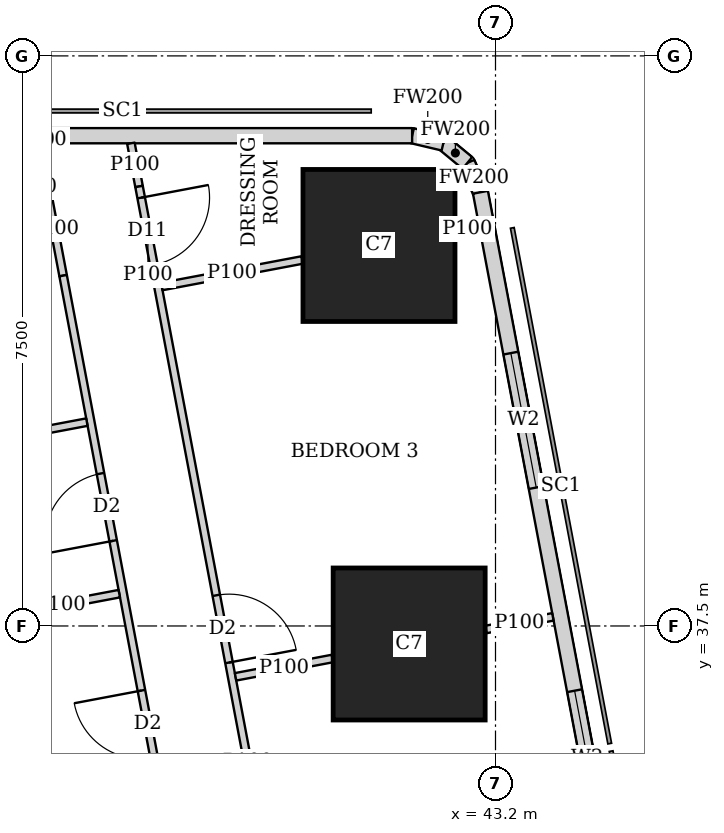
"""IFC4 building model, lengths in metres.
Left out: names, types, materials, properties, quantities, classifications, styles, units other than length and angle.
Written with IfcOpenShell. Run it as: python <this file> out.ifc"""

import sys

from ifc_helpers import new_model, si_unit, direction, frame, frame_2d, origin, origin_2d, place, context, subcontext, project, spatial, rectangle, extrude, element, fill, save


model = new_model("IFC4")
c1 = context("Model", 3, precision=1e-05, world=origin(), true_north=direction((0.0, 1.0)))
c2 = subcontext(c1, "Body", "Model", "MODEL_VIEW")
j1 = project(units=[si_unit("LENGTHUNIT", "METRE"), si_unit("PLANEANGLEUNIT", "RADIAN")], contexts=[c1])
p1 = place(None, origin())
s1 = spatial("IfcSite", under=j1, at=p1, CompositionType="ELEMENT")
p2 = place(p1, origin())
s2 = spatial("IfcBuilding", under=s1, at=p2, CompositionType="ELEMENT")
p3 = place(p2, frame((0.0, 0.0, 270.35)))
s3 = spatial("IfcBuildingStorey", under=s2, at=p3, CompositionType="ELEMENT", Elevation=270.35)
for number, where, z_axis, x_axis in (
    (1, (42.064, 37.263, 0.0), (0.0, 0.0, 1.0), (1.0, 0.0, 0.0)),
    (2, (41.667, 42.506, 0.0), (0.0, 0.0, 1.0), (1.0, 0.0, 0.0)),
):
    element("IfcColumn", number, at=place(p3, frame(where, z_axis=z_axis, x_axis=x_axis)), inside=s3, PredefinedType="COLUMN", context=c2, shape_type="SweptSolid", body=[
        extrude(rectangle(XDim=2.0, YDim=2.0, at=origin_2d()), origin(), (0.0, 0.0, 1.0), 3.75),
    ])
p4 = place(p3, frame((49.684, 7.832, 0.0), z_axis=(0.0, 0.0, 1.0), x_axis=(-0.185616669694, 0.982622232565, 0.0)))
e3 = element("IfcWall", 3, at=p4, inside=s3, PredefinedType="SOLIDWALL", context=c2, shape_type="SweptSolid", body=[
    extrude(rectangle(XDim=36.0, YDim=0.2, at=frame_2d((18.0, 0.0))), origin(), (0.0, 0.0, 1.0), 3.5),
])
p5 = place(p4, frame((2.518, 0.0, 0.9)))
e4 = element("IfcOpeningElement", 4, at=p5, cuts=e3, PredefinedType="OPENING", context=c2, shape_type="SweptSolid", body=[
    extrude(rectangle(XDim=2.4, YDim=1.5, at=frame_2d((1.2, 0.75))), frame((0.0, 0.11, 0.0), z_axis=(0.0, -1.0, 0.0), x_axis=(1.0, 0.0, 0.0)), (0.0, 0.0, 1.0), 0.22),
])
p6 = place(p4, frame((8.444, 0.0, 0.9)))
e5 = element("IfcOpeningElement", 5, at=p6, cuts=e3, PredefinedType="OPENING", context=c2, shape_type="SweptSolid", body=[
    extrude(rectangle(XDim=1.8, YDim=1.5, at=frame_2d((0.9, 0.75))), frame((0.0, 0.11, 0.0), z_axis=(0.0, -1.0, 0.0), x_axis=(1.0, 0.0, 0.0)), (0.0, 0.0, 1.0), 0.22),
])
p7 = place(p4, frame((12.261, 0.0, 0.9)))
e6 = element("IfcOpeningElement", 6, at=p7, cuts=e3, PredefinedType="OPENING", context=c2, shape_type="SweptSolid", body=[
    extrude(rectangle(XDim=1.8, YDim=1.5, at=frame_2d((0.9, 0.75))), frame((0.0, 0.11, 0.0), z_axis=(0.0, -1.0, 0.0), x_axis=(1.0, 0.0, 0.0)), (0.0, 0.0, 1.0), 0.22),
])
p8 = place(p4, frame((16.078, 0.0, 0.9)))
e7 = element("IfcOpeningElement", 7, at=p8, cuts=e3, PredefinedType="OPENING", context=c2, shape_type="SweptSolid", body=[
    extrude(rectangle(XDim=1.8, YDim=1.5, at=frame_2d((0.9, 0.75))), frame((0.0, 0.11, 0.0), z_axis=(0.0, -1.0, 0.0), x_axis=(1.0, 0.0, 0.0)), (0.0, 0.0, 1.0), 0.22),
])
p9 = place(p4, frame((19.894, 0.0, 0.9)))
e8 = element("IfcOpeningElement", 8, at=p9, cuts=e3, PredefinedType="OPENING", context=c2, shape_type="SweptSolid", body=[
    extrude(rectangle(XDim=1.8, YDim=1.5, at=frame_2d((0.9, 0.75))), frame((0.0, 0.11, 0.0), z_axis=(0.0, -1.0, 0.0), x_axis=(1.0, 0.0, 0.0)), (0.0, 0.0, 1.0), 0.22),
])
p10 = place(p4, frame((23.71, 0.0, 0.9)))
e9 = element("IfcOpeningElement", 9, at=p10, cuts=e3, PredefinedType="OPENING", context=c2, shape_type="SweptSolid", body=[
    extrude(rectangle(XDim=1.8, YDim=1.5, at=frame_2d((0.9, 0.75))), frame((0.0, 0.11, 0.0), z_axis=(0.0, -1.0, 0.0), x_axis=(1.0, 0.0, 0.0)), (0.0, 0.0, 1.0), 0.22),
])
p11 = place(p4, frame((27.526, 0.0, 0.9)))
e10 = element("IfcOpeningElement", 10, at=p11, cuts=e3, PredefinedType="OPENING", context=c2, shape_type="SweptSolid", body=[
    extrude(rectangle(XDim=1.8, YDim=1.5, at=frame_2d((0.9, 0.75))), frame((0.0, 0.11, 0.0), z_axis=(0.0, -1.0, 0.0), x_axis=(1.0, 0.0, 0.0)), (0.0, 0.0, 1.0), 0.22),
])
p12 = place(p4, frame((32.046, 0.0, 0.9)))
e11 = element("IfcOpeningElement", 11, at=p12, cuts=e3, PredefinedType="OPENING", context=c2, shape_type="SweptSolid", body=[
    extrude(rectangle(XDim=1.8, YDim=1.5, at=frame_2d((0.9, 0.75))), frame((0.0, 0.11, 0.0), z_axis=(0.0, -1.0, 0.0), x_axis=(1.0, 0.0, 0.0)), (0.0, 0.0, 1.0), 0.22),
])
p13 = place(p3, frame((43.002, 43.206, 0.0), z_axis=(0.0, 0.0, 1.0), x_axis=(-0.40678170573, 0.913525393124, 0.0)))
e12 = element("IfcWall", 12, at=p13, inside=s3, PredefinedType="SOLIDWALL", context=c2, shape_type="SweptSolid", body=[
    extrude(rectangle(XDim=0.423, YDim=0.2, at=frame_2d((0.211, 0.0))), origin(), (0.0, 0.0, 1.0), 3.5),
])
p14 = place(p3, frame((42.83, 43.592, 0.0), z_axis=(0.0, 0.0, 1.0), x_axis=(-0.771190539797, 0.636604391539, 0.0)))
e13 = element("IfcWall", 13, at=p14, inside=s3, PredefinedType="SOLIDWALL", context=c2, shape_type="SweptSolid", body=[
    extrude(rectangle(XDim=0.41, YDim=0.2, at=frame_2d((0.205, 0.0))), origin(), (0.0, 0.0, 1.0), 3.5),
])
p15 = place(p3, frame((42.514, 43.853, 0.0), z_axis=(0.0, 0.0, 1.0), x_axis=(-0.973288080424, 0.229587265555, 0.0)))
e14 = element("IfcWall", 14, at=p15, inside=s3, PredefinedType="SOLIDWALL", context=c2, shape_type="SweptSolid", body=[
    extrude(rectangle(XDim=0.422, YDim=0.2, at=frame_2d((0.211, 0.0))), origin(), (0.0, 0.0, 1.0), 3.5),
])
p16 = place(p3, frame((42.103, 43.95, 0.0), z_axis=(0.0, 0.0, 1.0), x_axis=(-1.0, 0.0, 0.0)))
e15 = element("IfcWall", 15, at=p16, inside=s3, PredefinedType="SOLIDWALL", context=c2, shape_type="SweptSolid", body=[
    extrude(rectangle(XDim=27.54, YDim=0.2, at=frame_2d((13.77, 0.0))), origin(), (0.0, 0.0, 1.0), 3.5),
])
p17 = place(p16, frame((10.603, 0.0, 0.9)))
e16 = element("IfcOpeningElement", 16, at=p17, cuts=e15, PredefinedType="OPENING", context=c2, shape_type="SweptSolid", body=[
    extrude(rectangle(XDim=1.8, YDim=1.5, at=frame_2d((0.9, 0.75))), frame((0.0, 0.11, 0.0), z_axis=(0.0, -1.0, 0.0), x_axis=(1.0, 0.0, 0.0)), (0.0, 0.0, 1.0), 0.22),
])
p18 = place(p16, frame((14.203, 0.0, 0.9)))
e17 = element("IfcOpeningElement", 17, at=p18, cuts=e15, PredefinedType="OPENING", context=c2, shape_type="SweptSolid", body=[
    extrude(rectangle(XDim=1.8, YDim=1.5, at=frame_2d((0.9, 0.75))), frame((0.0, 0.11, 0.0), z_axis=(0.0, -1.0, 0.0), x_axis=(1.0, 0.0, 0.0)), (0.0, 0.0, 1.0), 0.22),
])
p19 = place(p16, frame((17.803, 0.0, 0.9)))
e18 = element("IfcOpeningElement", 18, at=p19, cuts=e15, PredefinedType="OPENING", context=c2, shape_type="SweptSolid", body=[
    extrude(rectangle(XDim=1.8, YDim=1.5, at=frame_2d((0.9, 0.75))), frame((0.0, 0.11, 0.0), z_axis=(0.0, -1.0, 0.0), x_axis=(1.0, 0.0, 0.0)), (0.0, 0.0, 1.0), 0.22),
])
p20 = place(p16, frame((22.822, 0.0, 0.9)))
e19 = element("IfcOpeningElement", 19, at=p20, cuts=e15, PredefinedType="OPENING", context=c2, shape_type="SweptSolid", body=[
    extrude(rectangle(XDim=2.4, YDim=1.5, at=frame_2d((1.2, 0.75))), frame((0.0, 0.11, 0.0), z_axis=(0.0, -1.0, 0.0), x_axis=(1.0, 0.0, 0.0)), (0.0, 0.0, 1.0), 0.22),
])
p21 = place(p3, frame((34.036, 42.186, 0.0), z_axis=(0.0, 0.0, 1.0), x_axis=(0.185593518645, -0.9826266055, 0.0)))
e20 = element("IfcWall", 20, at=p21, inside=s3, PredefinedType="SOLIDWALL", context=c2, shape_type="SweptSolid", body=[
    extrude(rectangle(XDim=35.961, YDim=0.15, at=frame_2d((17.98, 0.0))), origin(), (0.0, 0.0, 1.0), 2.5),
])
p22 = place(p21, frame((15.529, 0.0, 0.0)))
e21 = element("IfcOpeningElement", 21, at=p22, cuts=e20, PredefinedType="OPENING", context=c2, shape_type="SweptSolid", body=[
    extrude(rectangle(XDim=1.0, YDim=2.1, at=frame_2d((0.5, 1.05))), frame((0.0, 0.085, 0.0), z_axis=(0.0, -1.0, 0.0), x_axis=(1.0, 0.0, 0.0)), (0.0, 0.0, 1.0), 0.17),
])
p23 = place(p21, frame((19.345, 0.0, 0.0)))
e22 = element("IfcOpeningElement", 22, at=p23, cuts=e20, PredefinedType="OPENING", context=c2, shape_type="SweptSolid", body=[
    extrude(rectangle(XDim=1.0, YDim=2.1, at=frame_2d((0.5, 1.05))), frame((0.0, 0.085, 0.0), z_axis=(0.0, -1.0, 0.0), x_axis=(1.0, 0.0, 0.0)), (0.0, 0.0, 1.0), 0.17),
])
p24 = place(p21, frame((30.594, 0.0, 0.0)))
e23 = element("IfcOpeningElement", 23, at=p24, cuts=e20, PredefinedType="OPENING", context=c2, shape_type="SweptSolid", body=[
    extrude(rectangle(XDim=1.0, YDim=2.1, at=frame_2d((0.5, 1.05))), frame((0.0, 0.085, 0.0), z_axis=(0.0, -1.0, 0.0), x_axis=(1.0, 0.0, 0.0)), (0.0, 0.0, 1.0), 0.17),
])
p25 = place(p3, frame((38.403, 43.85, 0.0), z_axis=(0.0, 0.0, 1.0), x_axis=(0.184976954078, -0.982742858768, 0.0)))
e24 = element("IfcWall", 24, at=p25, inside=s3, PredefinedType="PARTITIONING", context=c2, shape_type="SweptSolid", body=[
    extrude(rectangle(XDim=0.578, YDim=0.1, at=frame_2d((0.289, 0.0))), origin(), (0.0, 0.0, 1.0), 3.5),
])
p26 = place(p3, frame((38.51, 43.282, 0.0), z_axis=(0.0, 0.0, 1.0), x_axis=(0.185775287495, -0.982592256511, 0.0)))
e25 = element("IfcWall", 25, at=p26, inside=s3, PredefinedType="PARTITIONING", context=c2, shape_type="SweptSolid", body=[
    extrude(rectangle(XDim=1.259, YDim=0.1, at=frame_2d((0.629, 0.0))), origin(), (0.0, 0.0, 1.0), 2.05),
])
p27 = place(p26, frame((0.15, 0.0, 0.0)))
e26 = element("IfcOpeningElement", 26, at=p27, cuts=e25, PredefinedType="OPENING", context=c2, shape_type="SweptSolid", body=[
    extrude(rectangle(XDim=0.9, YDim=2.0, at=frame_2d((0.45, 1.0))), frame((0.0, 0.06, 0.0), z_axis=(0.0, -1.0, 0.0), x_axis=(1.0, 0.0, 0.0)), (0.0, 0.0, 1.0), 0.12),
])
p28 = place(p3, frame((38.744, 42.045, 0.0), z_axis=(0.0, 0.0, 1.0), x_axis=(0.185614085367, -0.982622720739, 0.0)))
e27 = element("IfcWall", 27, at=p28, inside=s3, PredefinedType="PARTITIONING", context=c2, shape_type="SweptSolid", body=[
    extrude(rectangle(XDim=12.898, YDim=0.1, at=frame_2d((6.449, 0.0))), origin(), (0.0, 0.0, 1.0), 2.5),
])
p29 = place(p28, frame((11.848, 0.0, 0.0)))
e28 = element("IfcOpeningElement", 28, at=p29, cuts=e27, PredefinedType="OPENING", context=c2, shape_type="SweptSolid", body=[
    extrude(rectangle(XDim=0.9, YDim=2.1, at=frame_2d((0.45, 1.05))), frame((0.0, 0.06, 0.0), z_axis=(0.0, -1.0, 0.0), x_axis=(1.0, 0.0, 0.0)), (0.0, 0.0, 1.0), 0.12),
])
p30 = place(p28, frame((8.191, 0.0, 0.0)))
e29 = element("IfcOpeningElement", 29, at=p30, cuts=e27, PredefinedType="OPENING", context=c2, shape_type="SweptSolid", body=[
    extrude(rectangle(XDim=0.9, YDim=2.1, at=frame_2d((0.45, 1.05))), frame((0.0, 0.06, 0.0), z_axis=(0.0, -1.0, 0.0), x_axis=(1.0, 0.0, 0.0)), (0.0, 0.0, 1.0), 0.12),
])
p31 = place(p28, frame((4.215, 0.0, 0.0)))
e30 = element("IfcOpeningElement", 30, at=p31, cuts=e27, PredefinedType="OPENING", context=c2, shape_type="SweptSolid", body=[
    extrude(rectangle(XDim=0.9, YDim=2.1, at=frame_2d((0.45, 1.05))), frame((0.0, 0.06, 0.0), z_axis=(0.0, -1.0, 0.0), x_axis=(1.0, 0.0, 0.0)), (0.0, 0.0, 1.0), 0.12),
])
p32 = place(p3, frame((37.277, 43.346, 0.0), z_axis=(0.0, 0.0, 1.0), x_axis=(0.185775287495, -0.982592256511, 0.0)))
e31 = element("IfcWall", 31, at=p32, inside=s3, PredefinedType="PARTITIONING", context=c2, shape_type="SweptSolid", body=[
    extrude(rectangle(XDim=1.259, YDim=0.1, at=frame_2d((0.629, 0.0))), origin(), (0.0, 0.0, 1.0), 2.05),
])
p33 = place(p3, frame((37.511, 42.109, 0.0), z_axis=(0.0, 0.0, 1.0), x_axis=(0.185550464988, -0.982634736279, 0.0)))
e32 = element("IfcWall", 32, at=p33, inside=s3, PredefinedType="PARTITIONING", context=c2, shape_type="SweptSolid", body=[
    extrude(rectangle(XDim=13.35, YDim=0.1, at=frame_2d((6.675, 0.0))), origin(), (0.0, 0.0, 1.0), 2.5),
])
p34 = place(p33, frame((11.845, 0.0, 0.0)))
e33 = element("IfcOpeningElement", 33, at=p34, cuts=e32, PredefinedType="OPENING", context=c2, shape_type="SweptSolid", body=[
    extrude(rectangle(XDim=0.9, YDim=2.1, at=frame_2d((0.45, 1.05))), frame((0.0, 0.06, 0.0), z_axis=(0.0, -1.0, 0.0), x_axis=(1.0, 0.0, 0.0)), (0.0, 0.0, 1.0), 0.12),
])
p35 = place(p33, frame((8.224, 0.0, 0.0)))
e34 = element("IfcOpeningElement", 34, at=p35, cuts=e32, PredefinedType="OPENING", context=c2, shape_type="SweptSolid", body=[
    extrude(rectangle(XDim=0.9, YDim=2.1, at=frame_2d((0.45, 1.05))), frame((0.0, 0.06, 0.0), z_axis=(0.0, -1.0, 0.0), x_axis=(1.0, 0.0, 0.0)), (0.0, 0.0, 1.0), 0.12),
])
p36 = place(p33, frame((2.65, 0.0, 0.0)))
e35 = element("IfcOpeningElement", 35, at=p36, cuts=e32, PredefinedType="OPENING", context=c2, shape_type="SweptSolid", body=[
    extrude(rectangle(XDim=0.9, YDim=2.1, at=frame_2d((0.45, 1.05))), frame((0.0, 0.06, 0.0), z_axis=(0.0, -1.0, 0.0), x_axis=(1.0, 0.0, 0.0)), (0.0, 0.0, 1.0), 0.12),
])
p37 = place(p33, frame((9.936, 0.0, 0.0)))
e36 = element("IfcOpeningElement", 36, at=p37, cuts=e32, PredefinedType="OPENING", context=c2, shape_type="SweptSolid", body=[
    extrude(rectangle(XDim=0.9, YDim=2.1, at=frame_2d((0.45, 1.05))), frame((0.0, 0.06, 0.0), z_axis=(0.0, -1.0, 0.0), x_axis=(1.0, 0.0, 0.0)), (0.0, 0.0, 1.0), 0.12),
])
p38 = place(p33, frame((5.555, 0.0, 0.0)))
e37 = element("IfcOpeningElement", 37, at=p38, cuts=e32, PredefinedType="OPENING", context=c2, shape_type="SweptSolid", body=[
    extrude(rectangle(XDim=0.9, YDim=2.1, at=frame_2d((0.45, 1.05))), frame((0.0, 0.06, 0.0), z_axis=(0.0, -1.0, 0.0), x_axis=(1.0, 0.0, 0.0)), (0.0, 0.0, 1.0), 0.12),
])
p39 = place(p3, frame((42.985, 42.755, 0.0), z_axis=(0.0, 0.0, 1.0), x_axis=(-0.98281924824, -0.184570651215, 0.0)))
e38 = element("IfcWall", 38, at=p39, inside=s3, PredefinedType="PARTITIONING", context=c2, shape_type="SweptSolid", body=[
    extrude(rectangle(XDim=0.313, YDim=0.1, at=frame_2d((0.157, 0.0))), origin(), (0.0, 0.0, 1.0), 3.5),
])
p40 = place(p3, frame((40.657, 42.315, 0.0), z_axis=(0.0, 0.0, 1.0), x_axis=(-0.982622785543, -0.185613742305, 0.0)))
e39 = element("IfcWall", 39, at=p40, inside=s3, PredefinedType="PARTITIONING", context=c2, shape_type="SweptSolid", body=[
    extrude(rectangle(XDim=1.88, YDim=0.1, at=frame_2d((0.94, 0.0))), origin(), (0.0, 0.0, 1.0), 2.05),
])
p41 = place(p3, frame((43.955, 37.62, 0.0), z_axis=(0.0, 0.0, 1.0), x_axis=(-0.982708424405, -0.18515980288, 0.0)))
e40 = element("IfcWall", 40, at=p41, inside=s3, PredefinedType="PARTITIONING", context=c2, shape_type="SweptSolid", body=[
    extrude(rectangle(XDim=0.897, YDim=0.1, at=frame_2d((0.448, 0.0))), origin(), (0.0, 0.0, 1.0), 3.5),
])
p42 = place(p3, frame((41.054, 37.072, 0.0), z_axis=(0.0, 0.0, 1.0), x_axis=(-0.982576752117, -0.185857273733, 0.0)))
e41 = element("IfcWall", 41, at=p42, inside=s3, PredefinedType="PARTITIONING", context=c2, shape_type="SweptSolid", body=[
    extrude(rectangle(XDim=1.297, YDim=0.1, at=frame_2d((0.648, 0.0))), origin(), (0.0, 0.0, 1.0), 3.5),
])
p43 = place(p3, frame((37.824, 40.182, 0.0), z_axis=(0.0, 0.0, 1.0), x_axis=(-0.982674977865, -0.185337227447, 0.0)))
e42 = element("IfcWall", 42, at=p43, inside=s3, PredefinedType="PARTITIONING", context=c2, shape_type="SweptSolid", body=[
    extrude(rectangle(XDim=3.275, YDim=0.1, at=frame_2d((1.637, 0.0))), origin(), (0.0, 0.0, 1.0), 3.5),
])
p44 = place(p3, frame((38.25, 37.925, 0.0), z_axis=(0.0, 0.0, 1.0), x_axis=(-0.982610209589, -0.185680305934, 0.0)))
e43 = element("IfcWall", 43, at=p44, inside=s3, PredefinedType="PARTITIONING", context=c2, shape_type="SweptSolid", body=[
    extrude(rectangle(XDim=1.567, YDim=0.1, at=frame_2d((0.784, 0.0))), origin(), (0.0, 0.0, 1.0), 3.5),
])
p45 = place(p11, origin())
e44 = element("IfcWindow", 44, at=p45, inside=s3, PartitioningType="SINGLE_PANEL", PredefinedType="WINDOW", context=c2, shape_type="SweptSolid", body=[
    extrude(rectangle(XDim=1.8, YDim=1.5, at=frame_2d((0.9, 0.75))), frame((0.0, 0.03, 0.0), z_axis=(0.0, -1.0, 0.0), x_axis=(1.0, 0.0, 0.0)), (0.0, 0.0, 1.0), 0.06),
])
fill(e10, e44)
p46 = place(p12, origin())
e45 = element("IfcWindow", 45, at=p46, inside=s3, PartitioningType="SINGLE_PANEL", PredefinedType="WINDOW", context=c2, shape_type="SweptSolid", body=[
    extrude(rectangle(XDim=1.8, YDim=1.5, at=frame_2d((0.9, 0.75))), frame((0.0, 0.03, 0.0), z_axis=(0.0, -1.0, 0.0), x_axis=(1.0, 0.0, 0.0)), (0.0, 0.0, 1.0), 0.06),
])
fill(e11, e45)
p47 = place(p27, origin())
e46 = element("IfcDoor", 46, at=p47, inside=s3, OperationType="SINGLE_SWING_LEFT", PredefinedType="DOOR", context=c2, shape_type="SweptSolid", body=[
    extrude(rectangle(XDim=0.9, YDim=2.0, at=frame_2d((0.45, 1.0))), frame((0.0, 0.025, 0.0), z_axis=(0.0, -1.0, 0.0), x_axis=(1.0, 0.0, 0.0)), (0.0, 0.0, 1.0), 0.05),
])
fill(e26, e46)
p48 = place(p31, origin())
e47 = element("IfcDoor", 47, at=p48, inside=s3, OperationType="SINGLE_SWING_RIGHT", PredefinedType="DOOR", context=c2, shape_type="SweptSolid", body=[
    extrude(rectangle(XDim=0.9, YDim=2.1, at=frame_2d((0.45, 1.05))), frame((0.0, 0.025, 0.0), z_axis=(0.0, -1.0, 0.0), x_axis=(1.0, 0.0, 0.0)), (0.0, 0.0, 1.0), 0.05),
])
fill(e30, e47)
p49 = place(p36, origin())
e48 = element("IfcDoor", 48, at=p49, inside=s3, OperationType="SINGLE_SWING_LEFT", PredefinedType="DOOR", context=c2, shape_type="SweptSolid", body=[
    extrude(rectangle(XDim=0.9, YDim=2.1, at=frame_2d((0.45, 1.05))), frame((0.0, 0.025, 0.0), z_axis=(0.0, -1.0, 0.0), x_axis=(1.0, 0.0, 0.0)), (0.0, 0.0, 1.0), 0.05),
])
fill(e35, e48)
p50 = place(p38, origin())
e49 = element("IfcDoor", 49, at=p50, inside=s3, OperationType="SINGLE_SWING_RIGHT", PredefinedType="DOOR", context=c2, shape_type="SweptSolid", body=[
    extrude(rectangle(XDim=0.9, YDim=2.1, at=frame_2d((0.45, 1.05))), frame((0.0, 0.025, 0.0), z_axis=(0.0, -1.0, 0.0), x_axis=(1.0, 0.0, 0.0)), (0.0, 0.0, 1.0), 0.05),
])
fill(e37, e49)
save(model, sys.argv[1])
